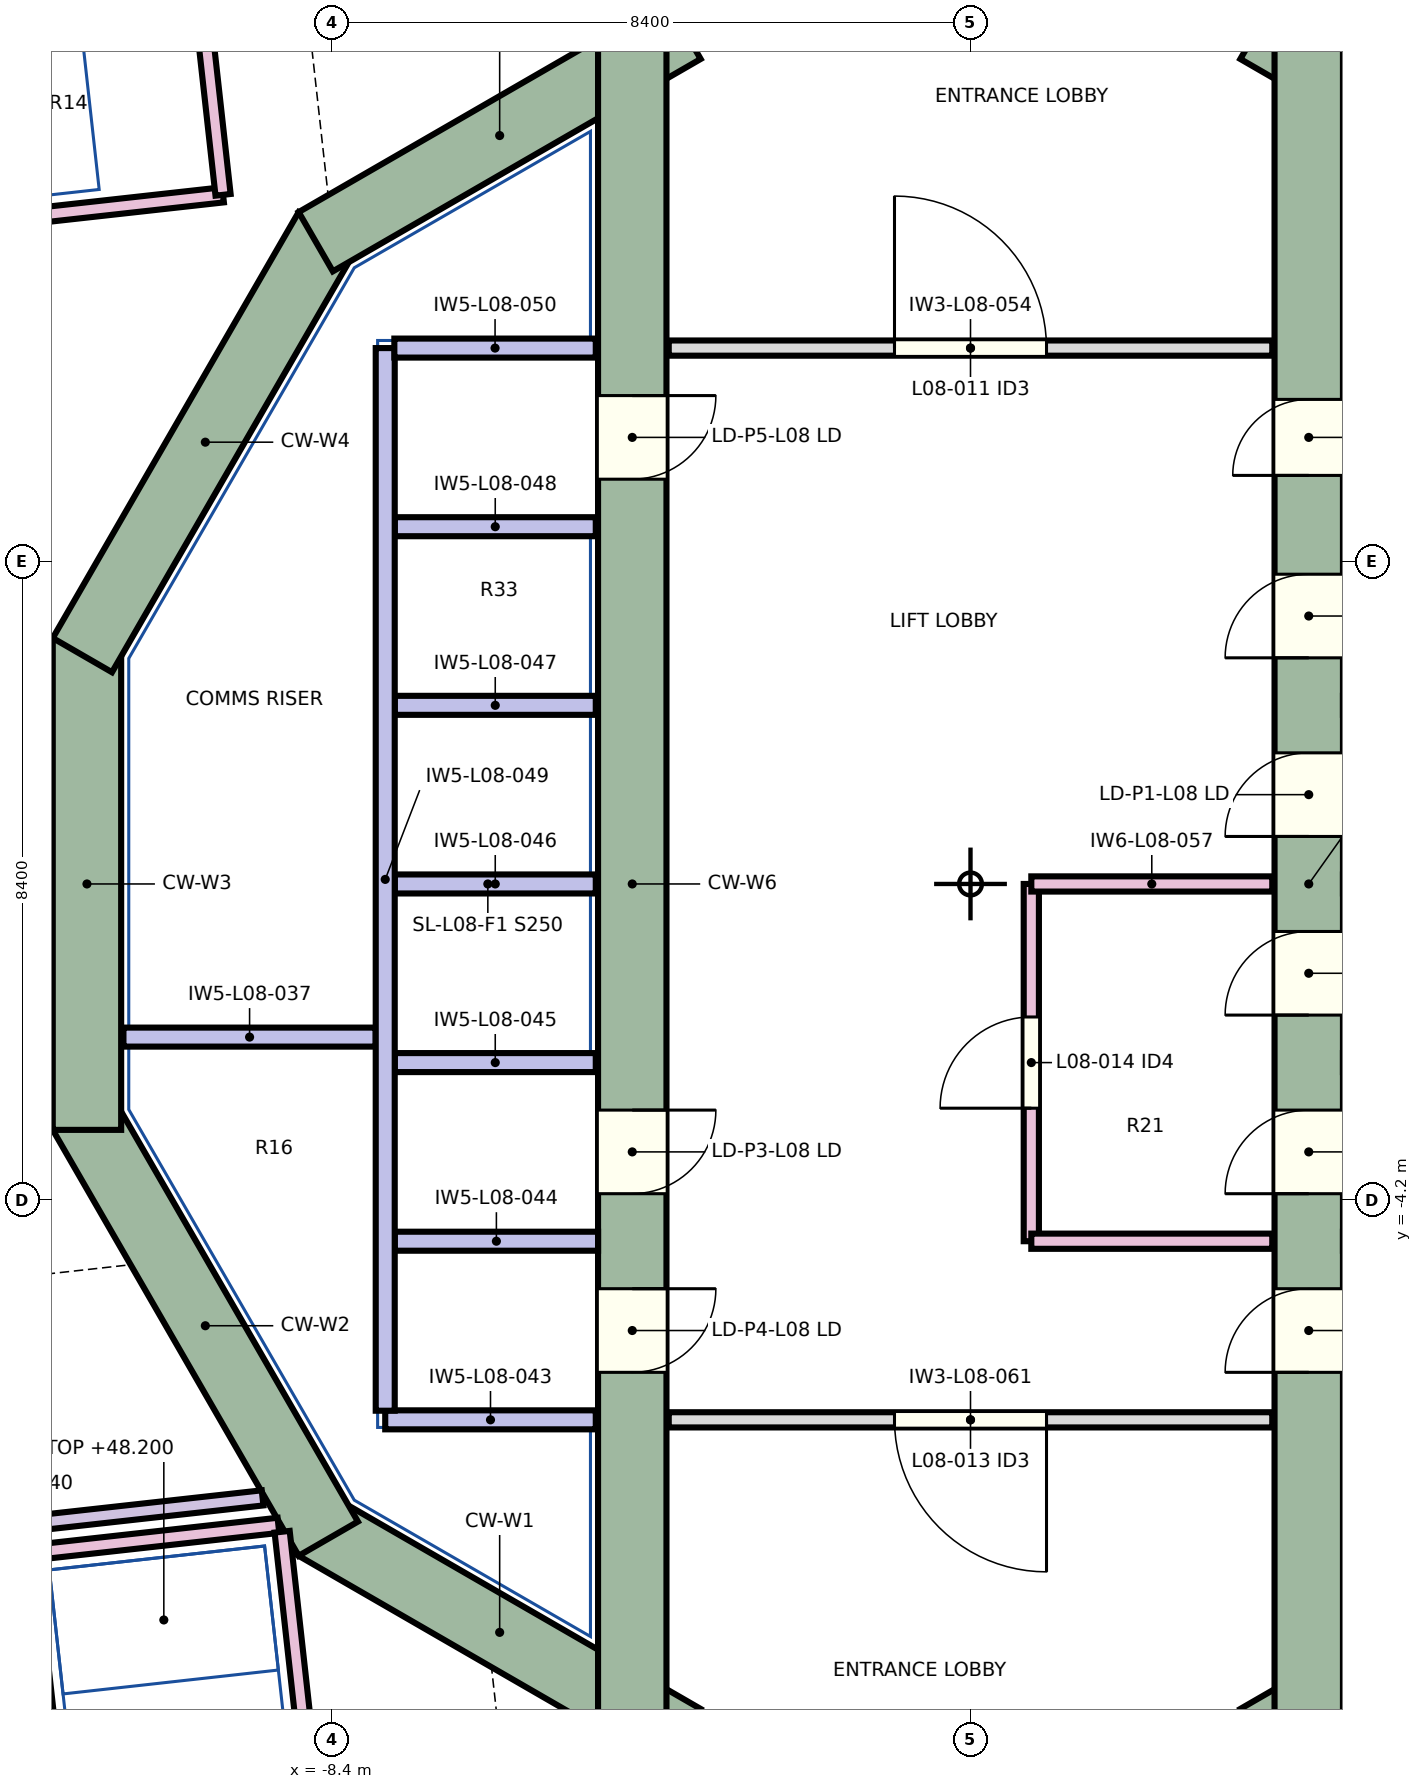
"""IFC4 building model, lengths in metres.
Left out: names, types, materials, properties, quantities, classifications, styles, units other than length and angle.
Written with IfcOpenShell. Run it as: python <this file> out.ifc"""

import sys

from ifc_helpers import new_model, si_unit, direction, frame, frame_2d, origin, place, context, subcontext, project, spatial, rectangle, extrude, element, fill, save


model = new_model("IFC4")
c1 = context("Model", 3, precision=1e-05, world=origin(), true_north=direction((0.0, 1.0)))
c2 = subcontext(c1, "Body", "Model", "MODEL_VIEW")
j1 = project(units=[si_unit("LENGTHUNIT", "METRE"), si_unit("PLANEANGLEUNIT", "RADIAN")], contexts=[c1])
p1 = place(None, origin())
s1 = spatial("IfcSite", under=j1, at=p1, CompositionType="ELEMENT")
p2 = place(p1, origin())
s2 = spatial("IfcBuilding", under=s1, at=p2, CompositionType="ELEMENT")
p3 = place(p2, frame((0.0, 0.0, 46.3)))
s3 = spatial("IfcBuildingStorey", under=s2, at=p3, CompositionType="ELEMENT", Elevation=46.3)
p4 = place(p3, frame((-3.775, -11.243, 0.0), z_axis=(0.0, 0.0, 1.0), x_axis=(-0.866026961591, 0.49999730179, 0.0)))
e1 = element("IfcWall", 1, at=p4, inside=s3, PredefinedType="SHEAR", context=c2, shape_type="SweptSolid", body=[
    extrude(rectangle(XDim=5.587, YDim=0.9, at=frame_2d((2.794, 0.0))), origin(), (0.0, 0.0, 1.0), 3.8),
])
p5 = place(p3, frame((-8.449, -8.614, 0.0), z_axis=(0.0, 0.0, 1.0), x_axis=(-0.499990282633, 0.866031014036, 0.0)))
e2 = element("IfcWall", 2, at=p5, inside=s3, PredefinedType="SHEAR", context=c2, shape_type="SweptSolid", body=[
    extrude(rectangle(XDim=6.47, YDim=0.9, at=frame_2d((3.235, 0.0))), origin(), (0.0, 0.0, 1.0), 3.8),
])
p6 = place(p3, frame((-11.624, -3.235, 0.0), z_axis=(0.0, 0.0, 1.0), x_axis=(0.0, 1.0, 0.0)))
e3 = element("IfcWall", 3, at=p6, inside=s3, PredefinedType="SHEAR", context=c2, shape_type="SweptSolid", body=[
    extrude(rectangle(XDim=6.471, YDim=0.9, at=frame_2d((3.235, 0.0))), origin(), (0.0, 0.0, 1.0), 3.8),
])
p7 = place(p3, frame((-11.684, 3.01, 0.0), z_axis=(0.0, 0.0, 1.0), x_axis=(0.499990282633, 0.866031014036, 0.0)))
e4 = element("IfcWall", 4, at=p7, inside=s3, PredefinedType="SHEAR", context=c2, shape_type="SweptSolid", body=[
    extrude(rectangle(XDim=6.47, YDim=0.9, at=frame_2d((3.235, 0.0))), origin(), (0.0, 0.0, 1.0), 3.8),
])
p8 = place(p3, frame((-8.614, 8.449, 0.0), z_axis=(0.0, 0.0, 1.0), x_axis=(0.866026961591, 0.49999730179, 0.0)))
e5 = element("IfcWall", 5, at=p8, inside=s3, PredefinedType="SHEAR", context=c2, shape_type="SweptSolid", body=[
    extrude(rectangle(XDim=5.587, YDim=0.9, at=frame_2d((2.794, 0.0))), origin(), (0.0, 0.0, 1.0), 3.8),
])
p9 = place(p3, frame((-4.45, 11.633, 0.0), z_axis=(0.0, 0.0, 1.0), x_axis=(0.0, -1.0, 0.0)))
e6 = element("IfcWall", 6, at=p9, inside=s3, PredefinedType="SHEAR", context=c2, shape_type="SweptSolid", body=[
    extrude(rectangle(XDim=23.265, YDim=0.9, at=frame_2d((11.633, 0.0))), origin(), (0.0, 0.0, 1.0), 3.8),
])
p10 = place(p9, frame((14.607, 0.0, 0.0)))
e7 = element("IfcOpeningElement", 7, at=p10, cuts=e6, PredefinedType="OPENING", context=c2, shape_type="SweptSolid", body=[
    extrude(rectangle(XDim=1.1, YDim=2.1, at=frame_2d((0.55, 1.05))), frame((0.0, 0.46, 0.0), z_axis=(0.0, -1.0, 0.0), x_axis=(1.0, 0.0, 0.0)), (0.0, 0.0, 1.0), 0.92),
])
p11 = place(p9, frame((16.958, 0.0, 0.0)))
e8 = element("IfcOpeningElement", 8, at=p11, cuts=e6, PredefinedType="OPENING", context=c2, shape_type="SweptSolid", body=[
    extrude(rectangle(XDim=1.1, YDim=2.1, at=frame_2d((0.55, 1.05))), frame((0.0, 0.46, 0.0), z_axis=(0.0, -1.0, 0.0), x_axis=(1.0, 0.0, 0.0)), (0.0, 0.0, 1.0), 0.92),
])
p12 = place(p9, frame((5.208, 0.0, 0.0)))
e9 = element("IfcOpeningElement", 9, at=p12, cuts=e6, PredefinedType="OPENING", context=c2, shape_type="SweptSolid", body=[
    extrude(rectangle(XDim=1.1, YDim=2.1, at=frame_2d((0.55, 1.05))), frame((0.0, 0.46, 0.0), z_axis=(0.0, -1.0, 0.0), x_axis=(1.0, 0.0, 0.0)), (0.0, 0.0, 1.0), 0.92),
])
for number, where, z_axis, x_axis in (
    (10, (3.775, 11.243, 0.0), (0.0, 0.0, 1.0), (0.866, -0.5, 0.0)),
    (11, (8.614, -8.449, 0.0), (0.0, 0.0, 1.0), (-0.866, -0.5, 0.0)),
):
    element("IfcWall", number, at=place(p3, frame(where, z_axis=z_axis, x_axis=x_axis)), inside=s3, PredefinedType="SHEAR", context=c2, shape_type="SweptSolid", body=[
        extrude(rectangle(XDim=5.587, YDim=0.9, at=frame_2d((2.794, 0.0))), origin(), (0.0, 0.0, 1.0), 3.8),
    ])
p13 = place(p3, frame((4.45, -11.633, 0.0), z_axis=(0.0, 0.0, 1.0), x_axis=(0.0, 1.0, 0.0)))
e12 = element("IfcWall", 12, at=p13, inside=s3, PredefinedType="SHEAR", context=c2, shape_type="SweptSolid", body=[
    extrude(rectangle(XDim=23.265, YDim=0.9, at=frame_2d((11.633, 0.0))), origin(), (0.0, 0.0, 1.0), 3.8),
])
p14 = place(p13, frame((7.558, 0.0, 0.0)))
e13 = element("IfcOpeningElement", 13, at=p14, cuts=e12, PredefinedType="OPENING", context=c2, shape_type="SweptSolid", body=[
    extrude(rectangle(XDim=1.1, YDim=2.1, at=frame_2d((0.55, 1.05))), frame((0.0, 0.46, 0.0), z_axis=(0.0, -1.0, 0.0), x_axis=(1.0, 0.0, 0.0)), (0.0, 0.0, 1.0), 0.92),
])
p15 = place(p13, frame((9.907, 0.0, 0.0)))
e14 = element("IfcOpeningElement", 14, at=p15, cuts=e12, PredefinedType="OPENING", context=c2, shape_type="SweptSolid", body=[
    extrude(rectangle(XDim=1.1, YDim=2.1, at=frame_2d((0.55, 1.05))), frame((0.0, 0.46, 0.0), z_axis=(0.0, -1.0, 0.0), x_axis=(1.0, 0.0, 0.0)), (0.0, 0.0, 1.0), 0.92),
])
p16 = place(p13, frame((12.258, 0.0, 0.0)))
e15 = element("IfcOpeningElement", 15, at=p16, cuts=e12, PredefinedType="OPENING", context=c2, shape_type="SweptSolid", body=[
    extrude(rectangle(XDim=1.1, YDim=2.1, at=frame_2d((0.55, 1.05))), frame((0.0, 0.46, 0.0), z_axis=(0.0, -1.0, 0.0), x_axis=(1.0, 0.0, 0.0)), (0.0, 0.0, 1.0), 0.92),
])
p17 = place(p13, frame((14.607, 0.0, 0.0)))
e16 = element("IfcOpeningElement", 16, at=p17, cuts=e12, PredefinedType="OPENING", context=c2, shape_type="SweptSolid", body=[
    extrude(rectangle(XDim=1.1, YDim=2.1, at=frame_2d((0.55, 1.05))), frame((0.0, 0.46, 0.0), z_axis=(0.0, -1.0, 0.0), x_axis=(1.0, 0.0, 0.0)), (0.0, 0.0, 1.0), 0.92),
])
p18 = place(p13, frame((5.208, 0.0, 0.0)))
e17 = element("IfcOpeningElement", 17, at=p18, cuts=e12, PredefinedType="OPENING", context=c2, shape_type="SweptSolid", body=[
    extrude(rectangle(XDim=1.1, YDim=2.1, at=frame_2d((0.55, 1.05))), frame((0.0, 0.46, 0.0), z_axis=(0.0, -1.0, 0.0), x_axis=(1.0, 0.0, 0.0)), (0.0, 0.0, 1.0), 0.92),
])
p19 = place(p13, frame((17.008, 0.0, 0.0)))
e18 = element("IfcOpeningElement", 18, at=p19, cuts=e12, PredefinedType="OPENING", context=c2, shape_type="SweptSolid", body=[
    extrude(rectangle(XDim=1.0, YDim=2.1, at=frame_2d((0.5, 1.05))), frame((0.0, 0.46, 0.0), z_axis=(0.0, -1.0, 0.0), x_axis=(1.0, 0.0, 0.0)), (0.0, 0.0, 1.0), 0.92),
])
p20 = place(p3, frame((-15.797, 8.404, 0.0), z_axis=(0.0, 0.0, 1.0), x_axis=(0.993897125329, 0.110310943534, 0.0)))
e19 = element("IfcWall", 19, at=p20, inside=s3, PredefinedType="SOLIDWALL", context=c2, shape_type="SweptSolid", body=[
    extrude(rectangle(XDim=6.0, YDim=0.2, at=frame_2d((3.0, 0.0))), origin(), (0.0, 0.0, 1.0), 3.55),
])
p21 = place(p3, frame((-12.396, -8.803, 0.0), z_axis=(0.0, 0.0, 1.0), x_axis=(0.110335171461, -0.993894436014, 0.0)))
e20 = element("IfcWall", 20, at=p21, inside=s3, PredefinedType="SOLIDWALL", context=c2, shape_type="SweptSolid", body=[
    extrude(rectangle(XDim=6.118, YDim=0.2, at=frame_2d((3.059, 0.0))), origin(), (0.0, 0.0, 1.0), 3.55),
])
p22 = place(p3, frame((-12.396, -8.803, 0.0), z_axis=(0.0, 0.0, 1.0), x_axis=(0.993897215684, 0.110310129436, 0.0)))
e21 = element("IfcWall", 21, at=p22, inside=s3, PredefinedType="SOLIDWALL", context=c2, shape_type="SweptSolid", body=[
    extrude(rectangle(XDim=3.311, YDim=0.2, at=frame_2d((1.656, 0.0))), origin(), (0.0, 0.0, 1.0), 3.55),
])
p23 = place(p3, frame((-11.144, -2.015, 0.0), z_axis=(0.0, 0.0, 1.0), x_axis=(1.0, 0.0, 0.0)))
e22 = element("IfcWall", 22, at=p23, inside=s3, PredefinedType="SOLIDWALL", context=c2, shape_type="SweptSolid", body=[
    extrude(rectangle(XDim=3.319, YDim=0.25, at=frame_2d((1.66, 0.0))), origin(), (0.0, 0.0, 1.0), 3.55),
])
p24 = place(p3, frame((-9.833, 9.066, 0.0), z_axis=(0.0, 0.0, 1.0), x_axis=(-0.110297715324, 0.993898593416, 0.0)))
e23 = element("IfcWall", 23, at=p24, inside=s3, PredefinedType="SOLIDWALL", context=c2, shape_type="SweptSolid", body=[
    extrude(rectangle(XDim=3.404, YDim=0.2, at=frame_2d((1.702, 0.0))), origin(), (0.0, 0.0, 1.0), 3.55),
])
p25 = place(p3, frame((-9.313, -8.077, 0.0), z_axis=(0.0, 0.0, 1.0), x_axis=(-0.993896259816, -0.110318741489, 0.0)))
e24 = element("IfcWall", 24, at=p25, inside=s3, PredefinedType="PARTITIONING", context=c2, shape_type="SweptSolid", body=[
    extrude(rectangle(XDim=6.652, YDim=0.2, at=frame_2d((3.326, 0.0))), origin(), (0.0, 0.0, 1.0), 3.55),
])
p26 = place(p3, frame((-8.391, -14.514, 0.0), z_axis=(0.0, 0.0, 1.0), x_axis=(-0.11031151838, 0.993897061527, 0.0)))
e25 = element("IfcWall", 25, at=p26, inside=s3, PredefinedType="SOLIDWALL", context=c2, shape_type="SweptSolid", body=[
    extrude(rectangle(XDim=6.029, YDim=0.2, at=frame_2d((3.014, 0.0))), origin(), (0.0, 0.0, 1.0), 3.55),
])
p27 = place(p3, frame((-7.7, -7.05, 0.0), z_axis=(0.0, 0.0, 1.0), x_axis=(1.0, 0.0, 0.0)))
e26 = element("IfcWall", 26, at=p27, inside=s3, PredefinedType="SOLIDWALL", context=c2, shape_type="SweptSolid", body=[
    extrude(rectangle(XDim=2.77, YDim=0.25, at=frame_2d((1.385, 0.0))), origin(), (0.0, 0.0, 1.0), 3.55),
])
p28 = place(p3, frame((-7.575, -4.7, 0.0), z_axis=(0.0, 0.0, 1.0), x_axis=(1.0, 0.0, 0.0)))
e27 = element("IfcWall", 27, at=p28, inside=s3, PredefinedType="SOLIDWALL", context=c2, shape_type="SweptSolid", body=[
    extrude(rectangle(XDim=2.675, YDim=0.25, at=frame_2d((1.337, 0.0))), origin(), (0.0, 0.0, 1.0), 3.55),
])
for number, where, z_axis, x_axis in (
    (28, (-7.575, -2.35, 0.0), (0.0, 0.0, 1.0), (1.0, 0.0, 0.0)),
    (29, (-7.575, 0.0, 0.0), (0.0, 0.0, 1.0), (1.0, 0.0, 0.0)),
    (30, (-7.575, 2.35, 0.0), (0.0, 0.0, 1.0), (1.0, 0.0, 0.0)),
    (31, (-7.575, 4.7, 0.0), (0.0, 0.0, 1.0), (1.0, 0.0, 0.0)),
):
    element("IfcWall", number, at=place(p3, frame(where, z_axis=z_axis, x_axis=x_axis)), inside=s3, PredefinedType="SOLIDWALL", context=c2, shape_type="SweptSolid", body=[
        extrude(rectangle(XDim=2.645, YDim=0.25, at=frame_2d((1.323, 0.0))), origin(), (0.0, 0.0, 1.0), 3.55),
    ])
p29 = place(p3, frame((-7.7, 7.05, 0.0), z_axis=(0.0, 0.0, 1.0), x_axis=(0.0, -1.0, 0.0)))
e32 = element("IfcWall", 32, at=p29, inside=s3, PredefinedType="SOLIDWALL", context=c2, shape_type="SweptSolid", body=[
    extrude(rectangle(XDim=13.98, YDim=0.25, at=frame_2d((6.99, 0.0))), origin(), (0.0, 0.0, 1.0), 3.55),
])
p30 = place(p3, frame((-4.93, 7.05, 0.0), z_axis=(0.0, 0.0, 1.0), x_axis=(-1.0, 0.0, 0.0)))
e33 = element("IfcWall", 33, at=p30, inside=s3, PredefinedType="SOLIDWALL", context=c2, shape_type="SweptSolid", body=[
    extrude(rectangle(XDim=2.65, YDim=0.25, at=frame_2d((1.325, 0.0))), origin(), (0.0, 0.0, 1.0), 3.55),
])
p31 = place(p3, frame((-3.97, 7.05, 0.0), z_axis=(0.0, 0.0, 1.0), x_axis=(1.0, 0.0, 0.0)))
e34 = element("IfcWall", 34, at=p31, inside=s3, PredefinedType="PARTITIONING", context=c2, shape_type="SweptSolid", body=[
    extrude(rectangle(XDim=7.94, YDim=0.2, at=frame_2d((3.97, 0.0))), origin(), (0.0, 0.0, 1.0), 3.55),
])
p32 = place(p31, frame((2.97, 0.0, 0.0)))
e35 = element("IfcOpeningElement", 35, at=p32, cuts=e34, PredefinedType="OPENING", context=c2, shape_type="SweptSolid", body=[
    extrude(rectangle(XDim=2.0, YDim=2.1, at=frame_2d((1.0, 1.05))), frame((0.0, 0.11, 0.0), z_axis=(0.0, -1.0, 0.0), x_axis=(1.0, 0.0, 0.0)), (0.0, 0.0, 1.0), 0.22),
])
p33 = place(p3, frame((0.8, -4.7, 0.0), z_axis=(0.0, 0.0, 1.0), x_axis=(0.0, 1.0, 0.0)))
e36 = element("IfcWall", 36, at=p33, inside=s3, PredefinedType="SOLIDWALL", context=c2, shape_type="SweptSolid", body=[
    extrude(rectangle(XDim=4.7, YDim=0.2, at=frame_2d((2.35, 0.0))), origin(), (0.0, 0.0, 1.0), 3.55),
])
p34 = place(p33, frame((1.75, 0.0, 0.0)))
e37 = element("IfcOpeningElement", 37, at=p34, cuts=e36, PredefinedType="OPENING", context=c2, shape_type="SweptSolid", body=[
    extrude(rectangle(XDim=1.2, YDim=2.1, at=frame_2d((0.6, 1.05))), frame((0.0, 0.11, 0.0), z_axis=(0.0, -1.0, 0.0), x_axis=(1.0, 0.0, 0.0)), (0.0, 0.0, 1.0), 0.22),
])
p35 = place(p3, frame((0.8, 0.0, 0.0), z_axis=(0.0, 0.0, 1.0), x_axis=(1.0, 0.0, 0.0)))
e38 = element("IfcWall", 38, at=p35, inside=s3, PredefinedType="SOLIDWALL", context=c2, shape_type="SweptSolid", body=[
    extrude(rectangle(XDim=3.17, YDim=0.2, at=frame_2d((1.585, 0.0))), origin(), (0.0, 0.0, 1.0), 3.55),
])
p36 = place(p3, frame((3.97, -7.05, 0.0), z_axis=(0.0, 0.0, 1.0), x_axis=(-1.0, 0.0, 0.0)))
e39 = element("IfcWall", 39, at=p36, inside=s3, PredefinedType="PARTITIONING", context=c2, shape_type="SweptSolid", body=[
    extrude(rectangle(XDim=7.94, YDim=0.2, at=frame_2d((3.97, 0.0))), origin(), (0.0, 0.0, 1.0), 3.55),
])
p37 = place(p36, frame((2.97, 0.0, 0.0)))
e40 = element("IfcOpeningElement", 40, at=p37, cuts=e39, PredefinedType="OPENING", context=c2, shape_type="SweptSolid", body=[
    extrude(rectangle(XDim=2.0, YDim=2.1, at=frame_2d((1.0, 1.05))), frame((0.0, 0.11, 0.0), z_axis=(0.0, -1.0, 0.0), x_axis=(1.0, 0.0, 0.0)), (0.0, 0.0, 1.0), 0.22),
])
p38 = place(p3, frame((3.97, -4.7, 0.0), z_axis=(0.0, 0.0, 1.0), x_axis=(-1.0, 0.0, 0.0)))
e41 = element("IfcWall", 41, at=p38, inside=s3, PredefinedType="SOLIDWALL", context=c2, shape_type="SweptSolid", body=[
    extrude(rectangle(XDim=3.17, YDim=0.2, at=frame_2d((1.585, 0.0))), origin(), (0.0, 0.0, 1.0), 3.55),
])
for number, where, z_axis, x_axis in (
    (42, (4.9, -4.7, 0.0), (0.0, 0.0, 1.0), (1.0, 0.0, 0.0)),
    (43, (4.9, 0.0, 0.0), (0.0, 0.0, 1.0), (1.0, 0.0, 0.0)),
):
    element("IfcWall", number, at=place(p3, frame(where, z_axis=z_axis, x_axis=x_axis)), inside=s3, PredefinedType="SOLIDWALL", context=c2, shape_type="SweptSolid", body=[
        extrude(rectangle(XDim=2.675, YDim=0.25, at=frame_2d((1.337, 0.0))), origin(), (0.0, 0.0, 1.0), 3.55),
    ])
p39 = place(p32, origin())
e44 = element("IfcDoor", 44, at=p39, inside=s3, OperationType="NOTDEFINED", PredefinedType="DOOR", context=c2, shape_type="SweptSolid", body=[
    extrude(rectangle(XDim=2.0, YDim=2.1, at=frame_2d((1.0, 1.05))), frame((0.0, 0.025, 0.0), z_axis=(0.0, -1.0, 0.0), x_axis=(1.0, 0.0, 0.0)), (0.0, 0.0, 1.0), 0.05),
])
fill(e35, e44)
p40 = place(p37, origin())
e45 = element("IfcDoor", 45, at=p40, inside=s3, OperationType="NOTDEFINED", PredefinedType="DOOR", context=c2, shape_type="SweptSolid", body=[
    extrude(rectangle(XDim=2.0, YDim=2.1, at=frame_2d((1.0, 1.05))), frame((0.0, 0.025, 0.0), z_axis=(0.0, -1.0, 0.0), x_axis=(1.0, 0.0, 0.0)), (0.0, 0.0, 1.0), 0.05),
])
fill(e40, e45)
p41 = place(p34, origin())
e46 = element("IfcDoor", 46, at=p41, inside=s3, OperationType="NOTDEFINED", PredefinedType="DOOR", context=c2, shape_type="SweptSolid", body=[
    extrude(rectangle(XDim=1.2, YDim=2.1, at=frame_2d((0.6, 1.05))), frame((0.0, 0.025, 0.0), z_axis=(0.0, -1.0, 0.0), x_axis=(1.0, 0.0, 0.0)), (0.0, 0.0, 1.0), 0.05),
])
fill(e37, e46)
p42 = place(p14, origin())
e47 = element("IfcDoor", 47, at=p42, inside=s3, OperationType="SLIDING_TO_LEFT", PredefinedType="DOOR", context=c2, shape_type="SweptSolid", body=[
    extrude(rectangle(XDim=1.1, YDim=2.1, at=frame_2d((0.55, 1.05))), frame((0.0, 0.025, 0.0), z_axis=(0.0, -1.0, 0.0), x_axis=(1.0, 0.0, 0.0)), (0.0, 0.0, 1.0), 0.05),
])
fill(e13, e47)
p43 = place(p15, origin())
e48 = element("IfcDoor", 48, at=p43, inside=s3, OperationType="SLIDING_TO_LEFT", PredefinedType="DOOR", context=c2, shape_type="SweptSolid", body=[
    extrude(rectangle(XDim=1.1, YDim=2.1, at=frame_2d((0.55, 1.05))), frame((0.0, 0.025, 0.0), z_axis=(0.0, -1.0, 0.0), x_axis=(1.0, 0.0, 0.0)), (0.0, 0.0, 1.0), 0.05),
])
fill(e14, e48)
p44 = place(p16, origin())
e49 = element("IfcDoor", 49, at=p44, inside=s3, OperationType="SLIDING_TO_LEFT", PredefinedType="DOOR", context=c2, shape_type="SweptSolid", body=[
    extrude(rectangle(XDim=1.1, YDim=2.1, at=frame_2d((0.55, 1.05))), frame((0.0, 0.025, 0.0), z_axis=(0.0, -1.0, 0.0), x_axis=(1.0, 0.0, 0.0)), (0.0, 0.0, 1.0), 0.05),
])
fill(e15, e49)
p45 = place(p17, origin())
e50 = element("IfcDoor", 50, at=p45, inside=s3, OperationType="SLIDING_TO_LEFT", PredefinedType="DOOR", context=c2, shape_type="SweptSolid", body=[
    extrude(rectangle(XDim=1.1, YDim=2.1, at=frame_2d((0.55, 1.05))), frame((0.0, 0.025, 0.0), z_axis=(0.0, -1.0, 0.0), x_axis=(1.0, 0.0, 0.0)), (0.0, 0.0, 1.0), 0.05),
])
fill(e16, e50)
p46 = place(p10, origin())
e51 = element("IfcDoor", 51, at=p46, inside=s3, OperationType="SLIDING_TO_LEFT", PredefinedType="DOOR", context=c2, shape_type="SweptSolid", body=[
    extrude(rectangle(XDim=1.1, YDim=2.1, at=frame_2d((0.55, 1.05))), frame((0.0, 0.025, 0.0), z_axis=(0.0, -1.0, 0.0), x_axis=(1.0, 0.0, 0.0)), (0.0, 0.0, 1.0), 0.05),
])
fill(e7, e51)
p47 = place(p11, origin())
e52 = element("IfcDoor", 52, at=p47, inside=s3, OperationType="SLIDING_TO_LEFT", PredefinedType="DOOR", context=c2, shape_type="SweptSolid", body=[
    extrude(rectangle(XDim=1.1, YDim=2.1, at=frame_2d((0.55, 1.05))), frame((0.0, 0.025, 0.0), z_axis=(0.0, -1.0, 0.0), x_axis=(1.0, 0.0, 0.0)), (0.0, 0.0, 1.0), 0.05),
])
fill(e8, e52)
p48 = place(p12, origin())
e53 = element("IfcDoor", 53, at=p48, inside=s3, OperationType="SLIDING_TO_LEFT", PredefinedType="DOOR", context=c2, shape_type="SweptSolid", body=[
    extrude(rectangle(XDim=1.1, YDim=2.1, at=frame_2d((0.55, 1.05))), frame((0.0, 0.025, 0.0), z_axis=(0.0, -1.0, 0.0), x_axis=(1.0, 0.0, 0.0)), (0.0, 0.0, 1.0), 0.05),
])
fill(e9, e53)
p49 = place(p18, origin())
e54 = element("IfcDoor", 54, at=p49, inside=s3, OperationType="SLIDING_TO_LEFT", PredefinedType="DOOR", context=c2, shape_type="SweptSolid", body=[
    extrude(rectangle(XDim=1.1, YDim=2.1, at=frame_2d((0.55, 1.05))), frame((0.0, 0.025, 0.0), z_axis=(0.0, -1.0, 0.0), x_axis=(1.0, 0.0, 0.0)), (0.0, 0.0, 1.0), 0.05),
])
fill(e17, e54)
p50 = place(p19, origin())
e55 = element("IfcDoor", 55, at=p50, inside=s3, OperationType="NOTDEFINED", PredefinedType="DOOR", context=c2, shape_type="SweptSolid", body=[
    extrude(rectangle(XDim=1.0, YDim=2.1, at=frame_2d((0.5, 1.05))), frame((0.0, 0.025, 0.0), z_axis=(0.0, -1.0, 0.0), x_axis=(1.0, 0.0, 0.0)), (0.0, 0.0, 1.0), 0.05),
])
fill(e18, e55)
save(model, sys.argv[1])
